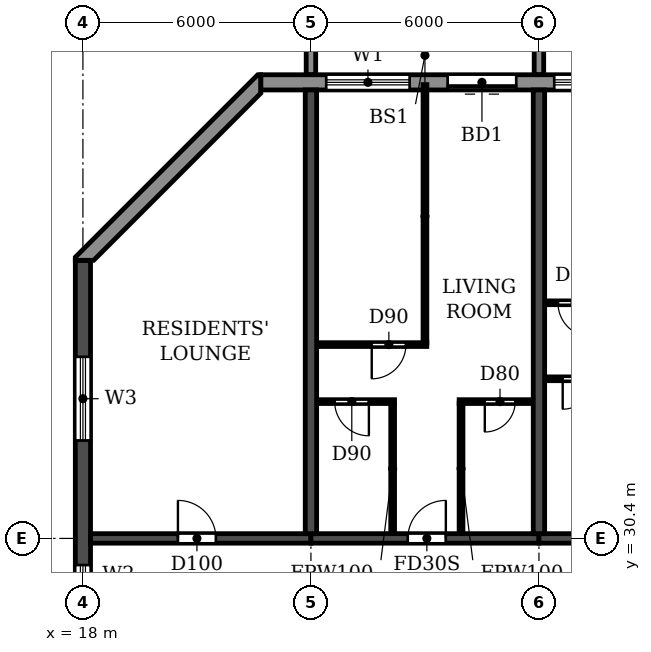
"""IFC4 building model, lengths in metres.
Left out: names, types, materials, properties, quantities, classifications, styles, units other than length and angle.
Written with IfcOpenShell. Run it as: python <this file> out.ifc"""

import sys

from ifc_helpers import new_model, si_unit, direction, frame, frame_2d, origin, place, context, subcontext, project, spatial, polyline, rectangle, outline, extrude, source, transform, mapped, element, fill, save


model = new_model("IFC4")
c1 = context("Model", 3, precision=1e-05, world=origin(), true_north=direction((0.0, 1.0)))
c2 = subcontext(c1, "Body", "Model", "MODEL_VIEW")
j1 = project(units=[si_unit("LENGTHUNIT", "METRE"), si_unit("PLANEANGLEUNIT", "RADIAN")], contexts=[c1])
p1 = place(None, origin())
s1 = spatial("IfcSite", under=j1, at=p1, CompositionType="ELEMENT")
p2 = place(p1, origin())
s2 = spatial("IfcBuilding", under=s1, at=p2, CompositionType="ELEMENT")
p3 = place(p2, frame((0.0, 0.0, 162.0)))
s3 = spatial("IfcBuildingStorey", under=s2, at=p3, CompositionType="ELEMENT", Elevation=162.0)
for number, where, z_axis, x_axis in (
    (1, (24.0, 30.525, 0.0), (0.0, 0.0, 1.0), (0.0, 1.0, 0.0)),
    (2, (30.0, 30.525, 0.0), (0.0, 0.0, 1.0), (0.0, 1.0, 0.0)),
):
    element("IfcWall", number, at=place(p3, frame(where, z_axis=z_axis, x_axis=x_axis)), inside=s3, PredefinedType="SHEAR", context=c2, shape_type="SweptSolid", body=[
        extrude(rectangle(XDim=11.675, YDim=0.3, at=frame_2d((5.837, 0.0))), origin(), (0.0, 0.0, 1.0), 2.95),
    ])
p4 = place(p3, frame((18.0, 4.683, 0.0), z_axis=(0.0, 0.0, 1.0), x_axis=(0.0, 1.0, 0.0)))
e3 = element("IfcWall", 3, at=p4, inside=s3, PredefinedType="SHEAR", context=c2, shape_type="SweptSolid", body=[
    extrude(rectangle(XDim=33.034, YDim=0.4, at=frame_2d((16.517, 0.0))), origin(), (0.0, 0.0, 1.0), 2.95),
])
p5 = place(p4, frame((23.817, 0.0, 0.9)))
e4 = element("IfcOpeningElement", 4, at=p5, cuts=e3, PredefinedType="OPENING", context=c2, shape_type="SweptSolid", body=[
    extrude(rectangle(XDim=1.2, YDim=1.5, at=frame_2d((0.6, 0.75))), frame((0.0, 0.21, 0.0), z_axis=(0.0, -1.0, 0.0), x_axis=(1.0, 0.0, 0.0)), (0.0, 0.0, 1.0), 0.42),
])
p6 = place(p4, frame((8.017, 0.0, 0.9)))
e5 = element("IfcOpeningElement", 5, at=p6, cuts=e3, PredefinedType="OPENING", context=c2, shape_type="SweptSolid", body=[
    extrude(rectangle(XDim=1.2, YDim=1.5, at=frame_2d((0.6, 0.75))), frame((0.0, 0.21, 0.0), z_axis=(0.0, -1.0, 0.0), x_axis=(1.0, 0.0, 0.0)), (0.0, 0.0, 1.0), 0.42),
])
p7 = place(p4, frame((28.293, 0.0, 0.6)))
e6 = element("IfcOpeningElement", 6, at=p7, cuts=e3, PredefinedType="OPENING", context=c2, shape_type="SweptSolid", body=[
    extrude(rectangle(XDim=2.2, YDim=1.8, at=frame_2d((1.1, 0.9))), frame((0.0, 0.21, 0.0), z_axis=(0.0, -1.0, 0.0), x_axis=(1.0, 0.0, 0.0)), (0.0, 0.0, 1.0), 0.42),
])
p8 = place(p4, frame((2.541, 0.0, 0.6)))
e7 = element("IfcOpeningElement", 7, at=p8, cuts=e3, PredefinedType="OPENING", context=c2, shape_type="SweptSolid", body=[
    extrude(rectangle(XDim=2.2, YDim=1.8, at=frame_2d((1.1, 0.9))), frame((0.0, 0.21, 0.0), z_axis=(0.0, -1.0, 0.0), x_axis=(1.0, 0.0, 0.0)), (0.0, 0.0, 1.0), 0.42),
])
p9 = place(p4, frame((15.917, 0.0, 0.9)))
e8 = element("IfcOpeningElement", 8, at=p9, cuts=e3, PredefinedType="OPENING", context=c2, shape_type="SweptSolid", body=[
    extrude(rectangle(XDim=1.2, YDim=1.5, at=frame_2d((0.6, 0.75))), frame((0.0, 0.21, 0.0), z_axis=(0.0, -1.0, 0.0), x_axis=(1.0, 0.0, 0.0)), (0.0, 0.0, 1.0), 0.42),
])
p10 = place(p3, frame((18.2, 30.4, 0.0), z_axis=(0.0, 0.0, 1.0), x_axis=(1.0, 0.0, 0.0)))
e9 = element("IfcWall", 9, at=p10, inside=s3, PredefinedType="SHEAR", context=c2, shape_type="SweptSolid", body=[
    extrude(rectangle(XDim=5.8, YDim=0.25, at=frame_2d((2.9, 0.0))), origin(), (0.0, 0.0, 1.0), 2.35),
])
p11 = place(p10, frame((2.3, 0.0, 0.0)))
e10 = element("IfcOpeningElement", 10, at=p11, cuts=e9, PredefinedType="OPENING", context=c2, shape_type="SweptSolid", body=[
    extrude(rectangle(XDim=1.0, YDim=2.1, at=frame_2d((0.5, 1.05))), frame((0.0, 0.135, 0.0), z_axis=(0.0, -1.0, 0.0), x_axis=(1.0, 0.0, 0.0)), (0.0, 0.0, 1.0), 0.27),
])
p12 = place(p3, frame((24.0, 30.4, 0.0), z_axis=(0.0, 0.0, 1.0), x_axis=(1.0, 0.0, 0.0)))
e11 = element("IfcWall", 11, at=p12, inside=s3, PredefinedType="SHEAR", context=c2, shape_type="SweptSolid", body=[
    extrude(rectangle(XDim=6.0, YDim=0.25, at=frame_2d((3.0, 0.0))), origin(), (0.0, 0.0, 1.0), 2.35),
])
p13 = place(p12, frame((2.55, 0.0, 0.0)))
e12 = element("IfcOpeningElement", 12, at=p13, cuts=e11, PredefinedType="OPENING", context=c2, shape_type="SweptSolid", body=[
    extrude(rectangle(XDim=1.0, YDim=2.1, at=frame_2d((0.5, 1.05))), frame((0.0, 0.135, 0.0), z_axis=(0.0, -1.0, 0.0), x_axis=(1.0, 0.0, 0.0)), (0.0, 0.0, 1.0), 0.27),
])
p14 = place(p3, frame((30.0, 30.4, 0.0), z_axis=(0.0, 0.0, 1.0), x_axis=(1.0, 0.0, 0.0)))
e13 = element("IfcWall", 13, at=p14, inside=s3, PredefinedType="SHEAR", context=c2, shape_type="SweptSolid", body=[
    extrude(rectangle(XDim=6.0, YDim=0.25, at=frame_2d((3.0, 0.0))), origin(), (0.0, 0.0, 1.0), 2.35),
])
p15 = place(p14, frame((2.45, 0.0, 0.0)))
e14 = element("IfcOpeningElement", 14, at=p15, cuts=e13, PredefinedType="OPENING", context=c2, shape_type="SweptSolid", body=[
    extrude(rectangle(XDim=1.0, YDim=2.1, at=frame_2d((0.5, 1.05))), frame((0.0, 0.135, 0.0), z_axis=(0.0, -1.0, 0.0), x_axis=(1.0, 0.0, 0.0)), (0.0, 0.0, 1.0), 0.27),
])
p16 = place(p3, frame((79.317, 42.4, 0.0), z_axis=(0.0, 0.0, 1.0), x_axis=(-1.0, 0.0, 0.0)))
e15 = element("IfcWall", 15, at=p16, inside=s3, PredefinedType="STANDARD", context=c2, shape_type="SweptSolid", body=[
    extrude(rectangle(XDim=56.634, YDim=0.4, at=frame_2d((28.317, 0.0))), origin(), (0.0, 0.0, 1.0), 2.95),
])
p17 = place(p16, frame((52.717, 0.0, 0.9)))
e16 = element("IfcOpeningElement", 16, at=p17, cuts=e15, PredefinedType="OPENING", context=c2, shape_type="SweptSolid", body=[
    extrude(rectangle(XDim=2.2, YDim=1.5, at=frame_2d((1.1, 0.75))), frame((0.0, 0.21, 0.0), z_axis=(0.0, -1.0, 0.0), x_axis=(1.0, 0.0, 0.0)), (0.0, 0.0, 1.0), 0.42),
])
p18 = place(p16, frame((49.917, 0.0, 0.0)))
e17 = element("IfcOpeningElement", 17, at=p18, cuts=e15, PredefinedType="OPENING", context=c2, shape_type="SweptSolid", body=[
    extrude(rectangle(XDim=1.8, YDim=2.4, at=frame_2d((0.9, 1.2))), frame((0.0, 0.21, 0.0), z_axis=(0.0, -1.0, 0.0), x_axis=(1.0, 0.0, 0.0)), (0.0, 0.0, 1.0), 0.42),
])
p19 = place(p16, frame((46.717, 0.0, 0.9)))
e18 = element("IfcOpeningElement", 18, at=p19, cuts=e15, PredefinedType="OPENING", context=c2, shape_type="SweptSolid", body=[
    extrude(rectangle(XDim=2.2, YDim=1.5, at=frame_2d((1.1, 0.75))), frame((0.0, 0.21, 0.0), z_axis=(0.0, -1.0, 0.0), x_axis=(1.0, 0.0, 0.0)), (0.0, 0.0, 1.0), 0.42),
])
p20 = place(p16, frame((43.917, 0.0, 0.0)))
e19 = element("IfcOpeningElement", 19, at=p20, cuts=e15, PredefinedType="OPENING", context=c2, shape_type="SweptSolid", body=[
    extrude(rectangle(XDim=1.8, YDim=2.4, at=frame_2d((0.9, 1.2))), frame((0.0, 0.21, 0.0), z_axis=(0.0, -1.0, 0.0), x_axis=(1.0, 0.0, 0.0)), (0.0, 0.0, 1.0), 0.42),
])
p21 = place(p16, frame((40.717, 0.0, 0.9)))
e20 = element("IfcOpeningElement", 20, at=p21, cuts=e15, PredefinedType="OPENING", context=c2, shape_type="SweptSolid", body=[
    extrude(rectangle(XDim=2.2, YDim=1.5, at=frame_2d((1.1, 0.75))), frame((0.0, 0.21, 0.0), z_axis=(0.0, -1.0, 0.0), x_axis=(1.0, 0.0, 0.0)), (0.0, 0.0, 1.0), 0.42),
])
p22 = place(p16, frame((37.917, 0.0, 0.0)))
e21 = element("IfcOpeningElement", 21, at=p22, cuts=e15, PredefinedType="OPENING", context=c2, shape_type="SweptSolid", body=[
    extrude(rectangle(XDim=1.8, YDim=2.4, at=frame_2d((0.9, 1.2))), frame((0.0, 0.21, 0.0), z_axis=(0.0, -1.0, 0.0), x_axis=(1.0, 0.0, 0.0)), (0.0, 0.0, 1.0), 0.42),
])
p23 = place(p16, frame((34.717, 0.0, 0.9)))
e22 = element("IfcOpeningElement", 22, at=p23, cuts=e15, PredefinedType="OPENING", context=c2, shape_type="SweptSolid", body=[
    extrude(rectangle(XDim=2.2, YDim=1.5, at=frame_2d((1.1, 0.75))), frame((0.0, 0.21, 0.0), z_axis=(0.0, -1.0, 0.0), x_axis=(1.0, 0.0, 0.0)), (0.0, 0.0, 1.0), 0.42),
])
p24 = place(p16, frame((31.717, 0.0, 0.9)))
e23 = element("IfcOpeningElement", 23, at=p24, cuts=e15, PredefinedType="OPENING", context=c2, shape_type="SweptSolid", body=[
    extrude(rectangle(XDim=2.2, YDim=1.5, at=frame_2d((1.1, 0.75))), frame((0.0, 0.21, 0.0), z_axis=(0.0, -1.0, 0.0), x_axis=(1.0, 0.0, 0.0)), (0.0, 0.0, 1.0), 0.42),
])
p25 = place(p16, frame((28.717, 0.0, 0.9)))
e24 = element("IfcOpeningElement", 24, at=p25, cuts=e15, PredefinedType="OPENING", context=c2, shape_type="SweptSolid", body=[
    extrude(rectangle(XDim=2.2, YDim=1.5, at=frame_2d((1.1, 0.75))), frame((0.0, 0.21, 0.0), z_axis=(0.0, -1.0, 0.0), x_axis=(1.0, 0.0, 0.0)), (0.0, 0.0, 1.0), 0.42),
])
p26 = place(p16, frame((25.717, 0.0, 0.9)))
e25 = element("IfcOpeningElement", 25, at=p26, cuts=e15, PredefinedType="OPENING", context=c2, shape_type="SweptSolid", body=[
    extrude(rectangle(XDim=2.2, YDim=1.5, at=frame_2d((1.1, 0.75))), frame((0.0, 0.21, 0.0), z_axis=(0.0, -1.0, 0.0), x_axis=(1.0, 0.0, 0.0)), (0.0, 0.0, 1.0), 0.42),
])
p27 = place(p16, frame((22.717, 0.0, 0.9)))
e26 = element("IfcOpeningElement", 26, at=p27, cuts=e15, PredefinedType="OPENING", context=c2, shape_type="SweptSolid", body=[
    extrude(rectangle(XDim=2.2, YDim=1.5, at=frame_2d((1.1, 0.75))), frame((0.0, 0.21, 0.0), z_axis=(0.0, -1.0, 0.0), x_axis=(1.0, 0.0, 0.0)), (0.0, 0.0, 1.0), 0.42),
])
p28 = place(p16, frame((19.917, 0.0, 0.0)))
e27 = element("IfcOpeningElement", 27, at=p28, cuts=e15, PredefinedType="OPENING", context=c2, shape_type="SweptSolid", body=[
    extrude(rectangle(XDim=1.8, YDim=2.4, at=frame_2d((0.9, 1.2))), frame((0.0, 0.21, 0.0), z_axis=(0.0, -1.0, 0.0), x_axis=(1.0, 0.0, 0.0)), (0.0, 0.0, 1.0), 0.42),
])
p29 = place(p16, frame((16.717, 0.0, 0.9)))
e28 = element("IfcOpeningElement", 28, at=p29, cuts=e15, PredefinedType="OPENING", context=c2, shape_type="SweptSolid", body=[
    extrude(rectangle(XDim=2.2, YDim=1.5, at=frame_2d((1.1, 0.75))), frame((0.0, 0.21, 0.0), z_axis=(0.0, -1.0, 0.0), x_axis=(1.0, 0.0, 0.0)), (0.0, 0.0, 1.0), 0.42),
])
p30 = place(p16, frame((13.717, 0.0, 0.9)))
e29 = element("IfcOpeningElement", 29, at=p30, cuts=e15, PredefinedType="OPENING", context=c2, shape_type="SweptSolid", body=[
    extrude(rectangle(XDim=2.2, YDim=1.5, at=frame_2d((1.1, 0.75))), frame((0.0, 0.21, 0.0), z_axis=(0.0, -1.0, 0.0), x_axis=(1.0, 0.0, 0.0)), (0.0, 0.0, 1.0), 0.42),
])
p31 = place(p16, frame((10.717, 0.0, 0.9)))
e30 = element("IfcOpeningElement", 30, at=p31, cuts=e15, PredefinedType="OPENING", context=c2, shape_type="SweptSolid", body=[
    extrude(rectangle(XDim=2.2, YDim=1.5, at=frame_2d((1.1, 0.75))), frame((0.0, 0.21, 0.0), z_axis=(0.0, -1.0, 0.0), x_axis=(1.0, 0.0, 0.0)), (0.0, 0.0, 1.0), 0.42),
])
p32 = place(p16, frame((7.917, 0.0, 0.0)))
e31 = element("IfcOpeningElement", 31, at=p32, cuts=e15, PredefinedType="OPENING", context=c2, shape_type="SweptSolid", body=[
    extrude(rectangle(XDim=1.8, YDim=2.4, at=frame_2d((0.9, 1.2))), frame((0.0, 0.21, 0.0), z_axis=(0.0, -1.0, 0.0), x_axis=(1.0, 0.0, 0.0)), (0.0, 0.0, 1.0), 0.42),
])
p33 = place(p16, frame((4.717, 0.0, 0.9)))
e32 = element("IfcOpeningElement", 32, at=p33, cuts=e15, PredefinedType="OPENING", context=c2, shape_type="SweptSolid", body=[
    extrude(rectangle(XDim=2.2, YDim=1.5, at=frame_2d((1.1, 0.75))), frame((0.0, 0.21, 0.0), z_axis=(0.0, -1.0, 0.0), x_axis=(1.0, 0.0, 0.0)), (0.0, 0.0, 1.0), 0.42),
])
p34 = place(p16, frame((1.917, 0.0, 0.0)))
e33 = element("IfcOpeningElement", 33, at=p34, cuts=e15, PredefinedType="OPENING", context=c2, shape_type="SweptSolid", body=[
    extrude(rectangle(XDim=1.8, YDim=2.4, at=frame_2d((0.9, 1.2))), frame((0.0, 0.21, 0.0), z_axis=(0.0, -1.0, 0.0), x_axis=(1.0, 0.0, 0.0)), (0.0, 0.0, 1.0), 0.42),
])
p35 = place(p3, origin())
e34 = element("IfcWall", 34, at=p35, inside=s3, PredefinedType="STANDARD", context=c2, shape_type="SweptSolid", body=[
    extrude(outline(polyline([(22.683, 42.6), (22.6, 42.6), (17.8, 37.8), (17.8, 37.717), (18.283, 37.717), (22.683, 42.117), (22.683, 42.6)])), origin(), (0.0, 0.0, 1.0), 2.95),
])
m1 = source(origin(), c2, "Body", "SweptSolid", [
    extrude(outline(polyline([(0.0, 0.0), (0.25, 0.0), (0.25, 3.1), (0.0, 3.1), (0.0, 0.0)])), origin(), (0.0, 0.0, 1.0), 3.1),
])
for number, where in (
    (35, (23.875, 42.6, 0.0)),
    (36, (29.875, 42.6, 0.0)),
):
    element("IfcWall", number, at=place(p3, frame(where)), inside=s3, PredefinedType="STANDARD", context=c2, shape_type="MappedRepresentation", body=[
        mapped(m1, transform((0.0, 0.0, 0.0))),
    ])
p36 = place(p3, frame((24.16, 34.0, 0.0), z_axis=(0.0, 0.0, 1.0), x_axis=(1.0, 0.0, 0.0)))
e37 = element("IfcWall", 37, at=p36, inside=s3, PredefinedType="PARTITIONING", context=c2, shape_type="SweptSolid", body=[
    extrude(rectangle(XDim=2.04, YDim=0.1, at=frame_2d((1.02, 0.0))), origin(), (0.0, 0.0, 1.0), 2.95),
])
p37 = place(p36, frame((0.465, 0.0, 0.0)))
e38 = element("IfcOpeningElement", 38, at=p37, cuts=e37, PredefinedType="OPENING", context=c2, shape_type="SweptSolid", body=[
    extrude(rectangle(XDim=0.9, YDim=2.1, at=frame_2d((0.45, 1.05))), frame((0.0, 0.06, 0.0), z_axis=(0.0, -1.0, 0.0), x_axis=(1.0, 0.0, 0.0)), (0.0, 0.0, 1.0), 0.12),
])
p38 = place(p3, frame((27.9, 34.0, 0.0), z_axis=(0.0, 0.0, 1.0), x_axis=(1.0, 0.0, 0.0)))
e39 = element("IfcWall", 39, at=p38, inside=s3, PredefinedType="PARTITIONING", context=c2, shape_type="SweptSolid", body=[
    extrude(rectangle(XDim=1.94, YDim=0.1, at=frame_2d((0.97, 0.0))), origin(), (0.0, 0.0, 1.0), 2.95),
])
p39 = place(p38, frame((0.675, 0.0, 0.0)))
e40 = element("IfcOpeningElement", 40, at=p39, cuts=e39, PredefinedType="OPENING", context=c2, shape_type="SweptSolid", body=[
    extrude(rectangle(XDim=0.8, YDim=2.1, at=frame_2d((0.4, 1.05))), frame((0.0, 0.06, 0.0), z_axis=(0.0, -1.0, 0.0), x_axis=(1.0, 0.0, 0.0)), (0.0, 0.0, 1.0), 0.12),
])
p40 = place(p3, frame((30.16, 34.6, 0.0), z_axis=(0.0, 0.0, 1.0), x_axis=(1.0, 0.0, 0.0)))
e41 = element("IfcWall", 41, at=p40, inside=s3, PredefinedType="PARTITIONING", context=c2, shape_type="SweptSolid", body=[
    extrude(rectangle(XDim=1.94, YDim=0.1, at=frame_2d((0.97, 0.0))), origin(), (0.0, 0.0, 1.0), 2.95),
])
p41 = place(p40, frame((0.465, 0.0, 0.0)))
e42 = element("IfcOpeningElement", 42, at=p41, cuts=e41, PredefinedType="OPENING", context=c2, shape_type="SweptSolid", body=[
    extrude(rectangle(XDim=0.8, YDim=2.1, at=frame_2d((0.4, 1.05))), frame((0.0, 0.06, 0.0), z_axis=(0.0, -1.0, 0.0), x_axis=(1.0, 0.0, 0.0)), (0.0, 0.0, 1.0), 0.12),
])
p42 = place(p3, frame((24.16, 35.5, 0.0), z_axis=(0.0, 0.0, 1.0), x_axis=(1.0, 0.0, 0.0)))
e43 = element("IfcWall", 43, at=p42, inside=s3, PredefinedType="PARTITIONING", context=c2, shape_type="SweptSolid", body=[
    extrude(rectangle(XDim=2.89, YDim=0.1, at=frame_2d((1.445, 0.0))), origin(), (0.0, 0.0, 1.0), 2.95),
])
p43 = place(p42, frame((1.44, 0.0, 0.0)))
e44 = element("IfcOpeningElement", 44, at=p43, cuts=e43, PredefinedType="OPENING", context=c2, shape_type="SweptSolid", body=[
    extrude(rectangle(XDim=0.9, YDim=2.1, at=frame_2d((0.45, 1.05))), frame((0.0, 0.06, 0.0), z_axis=(0.0, -1.0, 0.0), x_axis=(1.0, 0.0, 0.0)), (0.0, 0.0, 1.0), 0.12),
])
p44 = place(p3, frame((30.16, 36.6, 0.0), z_axis=(0.0, 0.0, 1.0), x_axis=(1.0, 0.0, 0.0)))
e45 = element("IfcWall", 45, at=p44, inside=s3, PredefinedType="PARTITIONING", context=c2, shape_type="SweptSolid", body=[
    extrude(rectangle(XDim=2.89, YDim=0.1, at=frame_2d((1.445, 0.0))), origin(), (0.0, 0.0, 1.0), 2.95),
])
p45 = place(p44, frame((0.34, 0.0, 0.0)))
e46 = element("IfcOpeningElement", 46, at=p45, cuts=e45, PredefinedType="OPENING", context=c2, shape_type="SweptSolid", body=[
    extrude(rectangle(XDim=0.9, YDim=2.1, at=frame_2d((0.45, 1.05))), frame((0.0, 0.06, 0.0), z_axis=(0.0, -1.0, 0.0), x_axis=(1.0, 0.0, 0.0)), (0.0, 0.0, 1.0), 0.12),
])
p46 = place(p3, frame((26.15, 30.535, 0.0), z_axis=(0.0, 0.0, 1.0), x_axis=(0.0, 1.0, 0.0)))
e47 = element("IfcWall", 47, at=p46, inside=s3, PredefinedType="PARTITIONING", context=c2, shape_type="SweptSolid", body=[
    extrude(rectangle(XDim=3.415, YDim=0.1, at=frame_2d((1.708, 0.0))), origin(), (0.0, 0.0, 1.0), 2.95),
])
p47 = place(p3, frame((27.0, 35.55, 0.0), z_axis=(0.0, 0.0, 1.0), x_axis=(0.0, 1.0, 0.0)))
e48 = element("IfcWall", 48, at=p47, inside=s3, PredefinedType="PARTITIONING", context=c2, shape_type="SweptSolid", body=[
    extrude(rectangle(XDim=6.79, YDim=0.1, at=frame_2d((3.395, 0.0))), origin(), (0.0, 0.0, 1.0), 2.95),
])
p48 = place(p3, frame((27.95, 30.535, 0.0), z_axis=(0.0, 0.0, 1.0), x_axis=(0.0, 1.0, 0.0)))
e49 = element("IfcWall", 49, at=p48, inside=s3, PredefinedType="PARTITIONING", context=c2, shape_type="SweptSolid", body=[
    extrude(rectangle(XDim=3.415, YDim=0.1, at=frame_2d((1.708, 0.0))), origin(), (0.0, 0.0, 1.0), 2.95),
])
p49 = place(p17, origin())
e50 = element("IfcWindow", 50, at=p49, inside=s3, PartitioningType="DOUBLE_PANEL_HORIZONTAL", PredefinedType="WINDOW", context=c2, shape_type="SweptSolid", body=[
    extrude(rectangle(XDim=2.2, YDim=1.5, at=frame_2d((1.1, 0.75))), frame((0.0, 0.03, 0.0), z_axis=(0.0, -1.0, 0.0), x_axis=(1.0, 0.0, 0.0)), (0.0, 0.0, 1.0), 0.06),
])
fill(e16, e50)
p50 = place(p18, origin())
e51 = element("IfcDoor", 51, at=p50, inside=s3, OperationType="DOUBLE_DOOR_SLIDING", PredefinedType="DOOR", context=c2, shape_type="SweptSolid", body=[
    extrude(rectangle(XDim=1.8, YDim=2.4, at=frame_2d((0.9, 1.2))), frame((0.0, 0.025, 0.0), z_axis=(0.0, -1.0, 0.0), x_axis=(1.0, 0.0, 0.0)), (0.0, 0.0, 1.0), 0.05),
])
fill(e17, e51)
p51 = place(p19, origin())
e52 = element("IfcWindow", 52, at=p51, inside=s3, PartitioningType="DOUBLE_PANEL_HORIZONTAL", PredefinedType="WINDOW", context=c2, shape_type="SweptSolid", body=[
    extrude(rectangle(XDim=2.2, YDim=1.5, at=frame_2d((1.1, 0.75))), frame((0.0, 0.03, 0.0), z_axis=(0.0, -1.0, 0.0), x_axis=(1.0, 0.0, 0.0)), (0.0, 0.0, 1.0), 0.06),
])
fill(e18, e52)
p52 = place(p5, origin())
e53 = element("IfcWindow", 53, at=p52, inside=s3, PartitioningType="SINGLE_PANEL", PredefinedType="WINDOW", context=c2, shape_type="SweptSolid", body=[
    extrude(rectangle(XDim=1.2, YDim=1.5, at=frame_2d((0.6, 0.75))), frame((0.0, 0.03, 0.0), z_axis=(0.0, -1.0, 0.0), x_axis=(1.0, 0.0, 0.0)), (0.0, 0.0, 1.0), 0.06),
])
fill(e4, e53)
p53 = place(p7, origin())
e54 = element("IfcWindow", 54, at=p53, inside=s3, PartitioningType="DOUBLE_PANEL_HORIZONTAL", PredefinedType="WINDOW", context=c2, shape_type="SweptSolid", body=[
    extrude(rectangle(XDim=2.2, YDim=1.8, at=frame_2d((1.1, 0.9))), frame((0.0, 0.03, 0.0), z_axis=(0.0, -1.0, 0.0), x_axis=(1.0, 0.0, 0.0)), (0.0, 0.0, 1.0), 0.06),
])
fill(e6, e54)
p54 = place(p11, origin())
e55 = element("IfcDoor", 55, at=p54, inside=s3, OperationType="SINGLE_SWING_LEFT", PredefinedType="DOOR", context=c2, shape_type="SweptSolid", body=[
    extrude(rectangle(XDim=1.0, YDim=2.1, at=frame_2d((0.5, 1.05))), frame((0.0, 0.025, 0.0), z_axis=(0.0, -1.0, 0.0), x_axis=(1.0, 0.0, 0.0)), (0.0, 0.0, 1.0), 0.05),
])
fill(e10, e55)
p55 = place(p37, frame((0.9, 0.0, 0.0), z_axis=(0.0, 0.0, 1.0), x_axis=(-1.0, 0.0, 0.0)))
e56 = element("IfcDoor", 56, at=p55, inside=s3, OperationType="SINGLE_SWING_LEFT", PredefinedType="DOOR", context=c2, shape_type="SweptSolid", body=[
    extrude(rectangle(XDim=0.9, YDim=2.1, at=frame_2d((0.45, 1.05))), frame((0.0, 0.025, 0.0), z_axis=(0.0, -1.0, 0.0), x_axis=(1.0, 0.0, 0.0)), (0.0, 0.0, 1.0), 0.05),
])
fill(e38, e56)
p56 = place(p43, frame((0.9, 0.0, 0.0), z_axis=(0.0, 0.0, 1.0), x_axis=(-1.0, 0.0, 0.0)))
e57 = element("IfcDoor", 57, at=p56, inside=s3, OperationType="SINGLE_SWING_RIGHT", PredefinedType="DOOR", context=c2, shape_type="SweptSolid", body=[
    extrude(rectangle(XDim=0.9, YDim=2.1, at=frame_2d((0.45, 1.05))), frame((0.0, 0.025, 0.0), z_axis=(0.0, -1.0, 0.0), x_axis=(1.0, 0.0, 0.0)), (0.0, 0.0, 1.0), 0.05),
])
fill(e44, e57)
p57 = place(p13, origin())
e58 = element("IfcDoor", 58, at=p57, inside=s3, OperationType="SINGLE_SWING_RIGHT", PredefinedType="DOOR", context=c2, shape_type="SweptSolid", body=[
    extrude(rectangle(XDim=1.0, YDim=2.1, at=frame_2d((0.5, 1.05))), frame((0.0, 0.025, 0.0), z_axis=(0.0, -1.0, 0.0), x_axis=(1.0, 0.0, 0.0)), (0.0, 0.0, 1.0), 0.05),
])
fill(e12, e58)
p58 = place(p39, frame((0.8, 0.0, 0.0), z_axis=(0.0, 0.0, 1.0), x_axis=(-1.0, 0.0, 0.0)))
e59 = element("IfcDoor", 59, at=p58, inside=s3, OperationType="SINGLE_SWING_RIGHT", PredefinedType="DOOR", context=c2, shape_type="SweptSolid", body=[
    extrude(rectangle(XDim=0.8, YDim=2.1, at=frame_2d((0.4, 1.05))), frame((0.0, 0.025, 0.0), z_axis=(0.0, -1.0, 0.0), x_axis=(1.0, 0.0, 0.0)), (0.0, 0.0, 1.0), 0.05),
])
fill(e40, e59)
p59 = place(p45, frame((0.9, 0.0, 0.0), z_axis=(0.0, 0.0, 1.0), x_axis=(-1.0, 0.0, 0.0)))
e60 = element("IfcDoor", 60, at=p59, inside=s3, OperationType="SINGLE_SWING_LEFT", PredefinedType="DOOR", context=c2, shape_type="SweptSolid", body=[
    extrude(rectangle(XDim=0.9, YDim=2.1, at=frame_2d((0.45, 1.05))), frame((0.0, 0.025, 0.0), z_axis=(0.0, -1.0, 0.0), x_axis=(1.0, 0.0, 0.0)), (0.0, 0.0, 1.0), 0.05),
])
fill(e46, e60)
p60 = place(p41, frame((0.8, 0.0, 0.0), z_axis=(0.0, 0.0, 1.0), x_axis=(-1.0, 0.0, 0.0)))
e61 = element("IfcDoor", 61, at=p60, inside=s3, OperationType="SINGLE_SWING_RIGHT", PredefinedType="DOOR", context=c2, shape_type="SweptSolid", body=[
    extrude(rectangle(XDim=0.8, YDim=2.1, at=frame_2d((0.4, 1.05))), frame((0.0, 0.025, 0.0), z_axis=(0.0, -1.0, 0.0), x_axis=(1.0, 0.0, 0.0)), (0.0, 0.0, 1.0), 0.05),
])
fill(e42, e61)
save(model, sys.argv[1])
